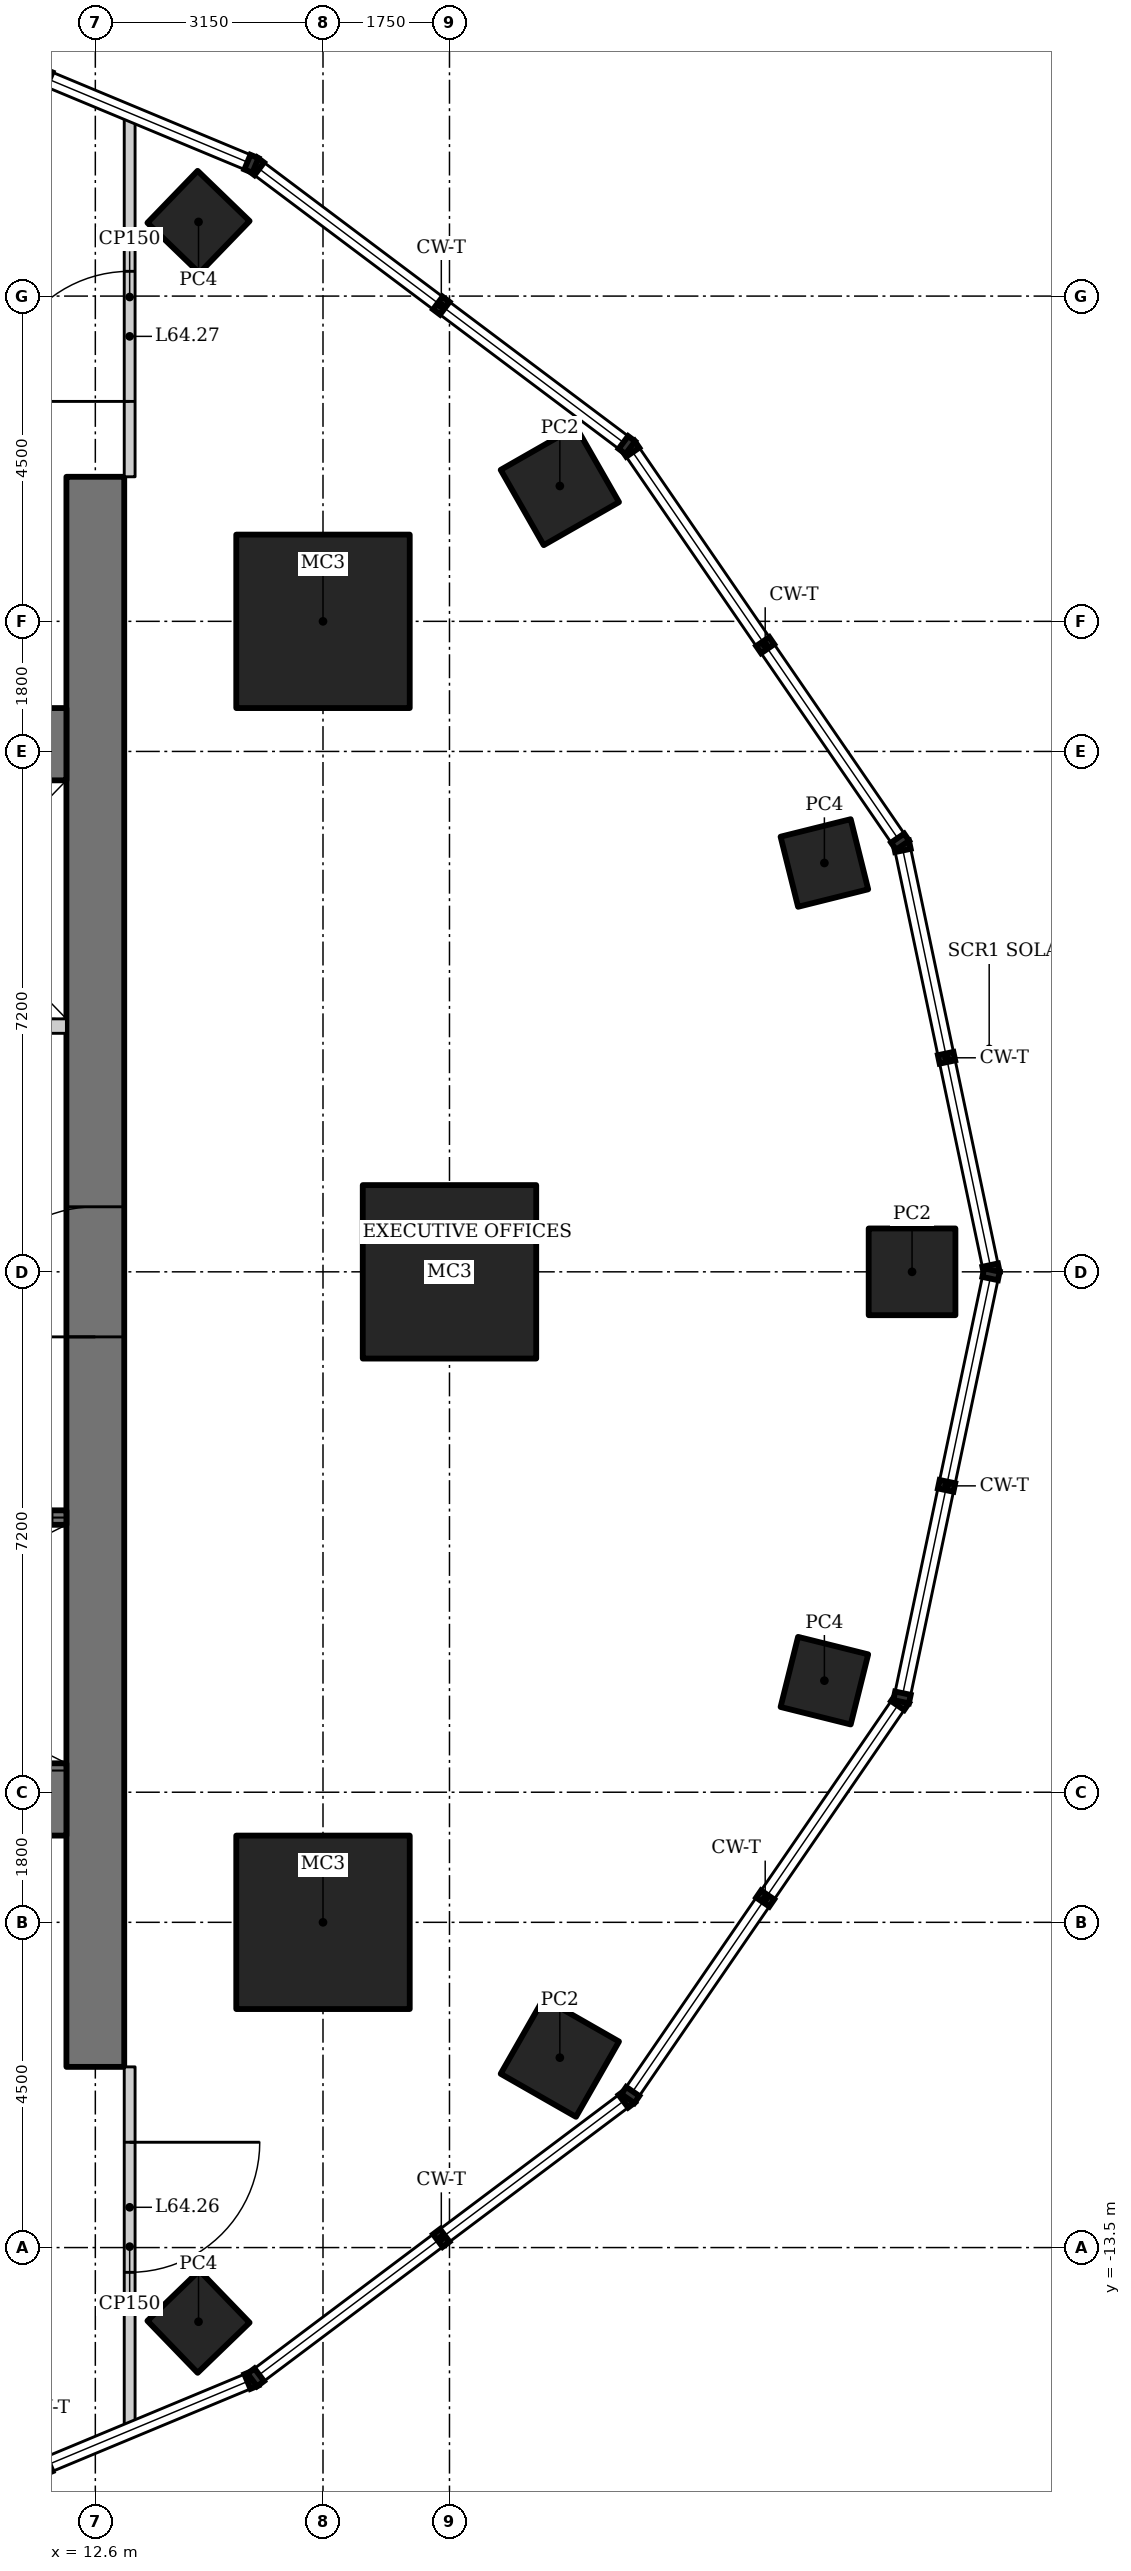
"""IFC4 building model, lengths in metres.
Left out: names, types, materials, properties, quantities, classifications, styles, units other than length and angle.
Written with IfcOpenShell. Run it as: python <this file> out.ifc"""

import sys

from ifc_helpers import new_model, si_unit, direction, frame, frame_2d, origin, origin_2d, place, context, subcontext, project, spatial, rectangle, hollow_rectangle, extrude, element, fill, save


model = new_model("IFC4")
c1 = context("Model", 3, precision=1e-05, world=origin(), true_north=direction((0.0, 1.0)))
c2 = subcontext(c1, "Body", "Model", "MODEL_VIEW")
j1 = project(units=[si_unit("LENGTHUNIT", "METRE"), si_unit("PLANEANGLEUNIT", "RADIAN")], contexts=[c1])
p1 = place(None, origin())
s1 = spatial("IfcSite", under=j1, at=p1, CompositionType="ELEMENT")
p2 = place(p1, origin())
s2 = spatial("IfcBuilding", under=s1, at=p2, CompositionType="ELEMENT")
p3 = place(p2, frame((0.0, 0.0, 274.9)))
s3 = spatial("IfcBuildingStorey", under=s2, at=p3, CompositionType="ELEMENT", Elevation=274.9)
for number, where, z_axis, x_axis in (
    (1, (17.5, 0.0, 0.0), (0.0, 0.0, 1.0), (1.0, 0.0, 0.0)),
    (2, (15.75, 9.0, 0.0), (0.0, 0.0, 1.0), (1.0, 0.0, 0.0)),
    (3, (15.75, -9.0, 0.0), (0.0, 0.0, 1.0), (1.0, 0.0, 0.0)),
):
    element("IfcColumn", number, at=place(p3, frame(where, z_axis=z_axis, x_axis=x_axis)), inside=s3, PredefinedType="COLUMN", context=c2, shape_type="SweptSolid", body=[
        extrude(hollow_rectangle(XDim=2.4, YDim=2.4, WallThickness=0.12, at=origin_2d()), origin(), (0.0, 0.0, 1.0), 4.5),
    ])
p4 = place(p3, frame((23.9, 0.0, 0.0), z_axis=(0.0, 0.0, 1.0), x_axis=(1.0, 0.0, 0.0)))
e4 = element("IfcColumn", 4, at=p4, inside=s3, PredefinedType="COLUMN", context=c2, shape_type="SweptSolid", body=[
    extrude(hollow_rectangle(XDim=1.2, YDim=1.2, WallThickness=0.1, at=origin_2d()), origin(), (0.0, 0.0, 1.0), 4.5),
])
p5 = place(p3, frame((22.687, 5.656, 0.0), z_axis=(0.0, 0.0, 1.0), x_axis=(0.970295726276, 0.2419218956, 0.0)))
e5 = element("IfcColumn", 5, at=p5, inside=s3, PredefinedType="COLUMN", context=c2, shape_type="SweptSolid", body=[
    extrude(hollow_rectangle(XDim=1.0, YDim=1.0, WallThickness=0.08, at=origin_2d()), origin(), (0.0, 0.0, 1.0), 4.5),
])
p6 = place(p3, frame((19.027, 10.873, 0.0), z_axis=(0.0, 0.0, 1.0), x_axis=(0.86824298017, 0.496139221777, 0.0)))
e6 = element("IfcColumn", 6, at=p6, inside=s3, PredefinedType="COLUMN", context=c2, shape_type="SweptSolid", body=[
    extrude(hollow_rectangle(XDim=1.2, YDim=1.2, WallThickness=0.1, at=origin_2d()), origin(), (0.0, 0.0, 1.0), 4.5),
])
for number, where, z_axis, x_axis in (
    (7, (14.028, 14.526, 0.0), (0.0, 0.0, 1.0), (0.695, 0.719, 0.0)),
    (8, (14.028, -14.526, 0.0), (0.0, 0.0, 1.0), (0.719, 0.695, 0.0)),
):
    element("IfcColumn", number, at=place(p3, frame(where, z_axis=z_axis, x_axis=x_axis)), inside=s3, PredefinedType="COLUMN", context=c2, shape_type="SweptSolid", body=[
        extrude(hollow_rectangle(XDim=1.0, YDim=1.0, WallThickness=0.08, at=origin_2d()), origin(), (0.0, 0.0, 1.0), 4.5),
    ])
p7 = place(p3, frame((19.027, -10.873, 0.0), z_axis=(0.0, 0.0, 1.0), x_axis=(0.496139221777, 0.86824298017, 0.0)))
e9 = element("IfcColumn", 9, at=p7, inside=s3, PredefinedType="COLUMN", context=c2, shape_type="SweptSolid", body=[
    extrude(hollow_rectangle(XDim=1.2, YDim=1.2, WallThickness=0.1, at=origin_2d()), origin(), (0.0, 0.0, 1.0), 4.5),
])
p8 = place(p3, frame((22.687, -5.656, 0.0), z_axis=(0.0, 0.0, 1.0), x_axis=(0.2419218956, 0.970295726276, 0.0)))
e10 = element("IfcColumn", 10, at=p8, inside=s3, PredefinedType="COLUMN", context=c2, shape_type="SweptSolid", body=[
    extrude(hollow_rectangle(XDim=1.0, YDim=1.0, WallThickness=0.08, at=origin_2d()), origin(), (0.0, 0.0, 1.0), 4.5),
])
p9 = place(p3, frame((12.6, -11.0, 0.0), z_axis=(0.0, 0.0, 1.0), x_axis=(0.0, 1.0, 0.0)))
e11 = element("IfcWall", 11, at=p9, inside=s3, PredefinedType="SHEAR", context=c2, shape_type="SweptSolid", body=[
    extrude(rectangle(XDim=22.0, YDim=0.8, at=frame_2d((11.0, 0.0))), origin(), (0.0, 0.0, 1.0), 4.5),
])
p10 = place(p9, frame((10.1, 0.0, 0.0)))
e12 = element("IfcOpeningElement", 12, at=p10, cuts=e11, PredefinedType="OPENING", context=c2, shape_type="SweptSolid", body=[
    extrude(rectangle(XDim=1.8, YDim=2.1, at=frame_2d((0.9, 1.05))), frame((0.0, 0.41, 0.0), z_axis=(0.0, -1.0, 0.0), x_axis=(1.0, 0.0, 0.0)), (0.0, 0.0, 1.0), 0.82),
])
p11 = place(p3, frame((-12.2, -7.3, 0.0), z_axis=(0.0, 0.0, 1.0), x_axis=(1.0, 0.0, 0.0)))
e13 = element("IfcWall", 13, at=p11, inside=s3, PredefinedType="SHEAR", context=c2, shape_type="SweptSolid", body=[
    extrude(rectangle(XDim=24.4, YDim=1.0, at=frame_2d((12.2, 0.0))), origin(), (0.0, 0.0, 1.0), 4.5),
])
p12 = place(p3, frame((12.2, 7.3, 0.0), z_axis=(0.0, 0.0, 1.0), x_axis=(-1.0, 0.0, 0.0)))
e14 = element("IfcWall", 14, at=p12, inside=s3, PredefinedType="SHEAR", context=c2, shape_type="SweptSolid", body=[
    extrude(rectangle(XDim=6.6, YDim=1.0, at=frame_2d((3.3, 0.0))), origin(), (0.0, 0.0, 1.0), 4.5),
])
p13 = place(p3, frame((5.6, -3.4, 0.0), z_axis=(0.0, 0.0, 1.0), x_axis=(1.0, 0.0, 0.0)))
e15 = element("IfcWall", 15, at=p13, inside=s3, PredefinedType="SHEAR", context=c2, shape_type="SweptSolid", body=[
    extrude(rectangle(XDim=6.6, YDim=0.2, at=frame_2d((3.3, 0.0))), origin(), (0.0, 0.0, 1.0), 4.5),
])
p14 = place(p13, frame((5.2, 0.0, 0.0)))
e16 = element("IfcOpeningElement", 16, at=p14, cuts=e15, PredefinedType="OPENING", context=c2, shape_type="SweptSolid", body=[
    extrude(rectangle(XDim=1.2, YDim=2.1, at=frame_2d((0.6, 1.05))), frame((0.0, 0.11, 0.0), z_axis=(0.0, -1.0, 0.0), x_axis=(1.0, 0.0, 0.0)), (0.0, 0.0, 1.0), 0.22),
])
p15 = place(p3, frame((12.2, 3.4, 0.0), z_axis=(0.0, 0.0, 1.0), x_axis=(-1.0, 0.0, 0.0)))
e17 = element("IfcWall", 17, at=p15, inside=s3, PredefinedType="SOLIDWALL", context=c2, shape_type="SweptSolid", body=[
    extrude(rectangle(XDim=6.6, YDim=0.2, at=frame_2d((3.3, 0.0))), origin(), (0.0, 0.0, 1.0), 4.5),
])
p16 = place(p15, frame((4.45, 0.0, 0.0)))
e18 = element("IfcOpeningElement", 18, at=p16, cuts=e17, PredefinedType="OPENING", context=c2, shape_type="SweptSolid", body=[
    extrude(rectangle(XDim=1.1, YDim=2.2, at=frame_2d((0.55, 1.1))), frame((0.0, 0.11, 0.0), z_axis=(0.0, -1.0, 0.0), x_axis=(1.0, 0.0, 0.0)), (0.0, 0.0, 1.0), 0.22),
])
p17 = place(p15, frame((0.9, 0.0, 0.0)))
e19 = element("IfcOpeningElement", 19, at=p17, cuts=e17, PredefinedType="OPENING", context=c2, shape_type="SweptSolid", body=[
    extrude(rectangle(XDim=1.4, YDim=2.2, at=frame_2d((0.7, 1.1))), frame((0.0, 0.11, 0.0), z_axis=(0.0, -1.0, 0.0), x_axis=(1.0, 0.0, 0.0)), (0.0, 0.0, 1.0), 0.22),
])
p18 = place(p3, frame((13.075, -11.0, 0.0), z_axis=(0.0, 0.0, 1.0), x_axis=(0.0, -1.0, 0.0)))
e20 = element("IfcWall", 20, at=p18, inside=s3, PredefinedType="PARTITIONING", context=c2, shape_type="SweptSolid", body=[
    extrude(rectangle(XDim=4.974, YDim=0.15, at=frame_2d((2.487, 0.0))), origin(), (0.0, 0.0, 1.0), 4.35),
])
p19 = place(p18, frame((1.043, 0.0, 0.0)))
e21 = element("IfcOpeningElement", 21, at=p19, cuts=e20, PredefinedType="OPENING", context=c2, shape_type="SweptSolid", body=[
    extrude(rectangle(XDim=1.8, YDim=2.1, at=frame_2d((0.9, 1.05))), frame((0.0, 0.085, 0.0), z_axis=(0.0, -1.0, 0.0), x_axis=(1.0, 0.0, 0.0)), (0.0, 0.0, 1.0), 0.17),
])
p20 = place(p3, frame((13.075, 11.0, 0.0), z_axis=(0.0, 0.0, 1.0), x_axis=(0.0, 1.0, 0.0)))
e22 = element("IfcWall", 22, at=p20, inside=s3, PredefinedType="PARTITIONING", context=c2, shape_type="SweptSolid", body=[
    extrude(rectangle(XDim=4.974, YDim=0.15, at=frame_2d((2.487, 0.0))), origin(), (0.0, 0.0, 1.0), 4.35),
])
p21 = place(p20, frame((1.043, 0.0, 0.0)))
e23 = element("IfcOpeningElement", 23, at=p21, cuts=e22, PredefinedType="OPENING", context=c2, shape_type="SweptSolid", body=[
    extrude(rectangle(XDim=1.8, YDim=2.1, at=frame_2d((0.9, 1.05))), frame((0.0, 0.085, 0.0), z_axis=(0.0, -1.0, 0.0), x_axis=(1.0, 0.0, 0.0)), (0.0, 0.0, 1.0), 0.17),
])
p22 = place(p14, origin())
e24 = element("IfcDoor", 24, at=p22, inside=s3, OperationType="SINGLE_SWING_RIGHT", PredefinedType="DOOR", context=c2, shape_type="SweptSolid", body=[
    extrude(rectangle(XDim=1.2, YDim=2.1, at=frame_2d((0.6, 1.05))), frame((0.0, 0.025, 0.0), z_axis=(0.0, -1.0, 0.0), x_axis=(1.0, 0.0, 0.0)), (0.0, 0.0, 1.0), 0.05),
])
fill(e16, e24)
p23 = place(p10, origin())
e25 = element("IfcDoor", 25, at=p23, inside=s3, OperationType="DOUBLE_DOOR_DOUBLE_SWING", PredefinedType="DOOR", context=c2, shape_type="SweptSolid", body=[
    extrude(rectangle(XDim=1.8, YDim=2.1, at=frame_2d((0.9, 1.05))), frame((0.0, 0.025, 0.0), z_axis=(0.0, -1.0, 0.0), x_axis=(1.0, 0.0, 0.0)), (0.0, 0.0, 1.0), 0.05),
])
fill(e12, e25)
p24 = place(p19, origin())
e26 = element("IfcDoor", 26, at=p24, inside=s3, OperationType="DOUBLE_DOOR_DOUBLE_SWING", PredefinedType="DOOR", context=c2, shape_type="SweptSolid", body=[
    extrude(rectangle(XDim=1.8, YDim=2.1, at=frame_2d((0.9, 1.05))), frame((0.0, 0.025, 0.0), z_axis=(0.0, -1.0, 0.0), x_axis=(1.0, 0.0, 0.0)), (0.0, 0.0, 1.0), 0.05),
])
fill(e21, e26)
p25 = place(p21, origin())
e27 = element("IfcDoor", 27, at=p25, inside=s3, OperationType="DOUBLE_DOOR_DOUBLE_SWING", PredefinedType="DOOR", context=c2, shape_type="SweptSolid", body=[
    extrude(rectangle(XDim=1.8, YDim=2.1, at=frame_2d((0.9, 1.05))), frame((0.0, 0.025, 0.0), z_axis=(0.0, -1.0, 0.0), x_axis=(1.0, 0.0, 0.0)), (0.0, 0.0, 1.0), 0.05),
])
fill(e23, e27)
save(model, sys.argv[1])
